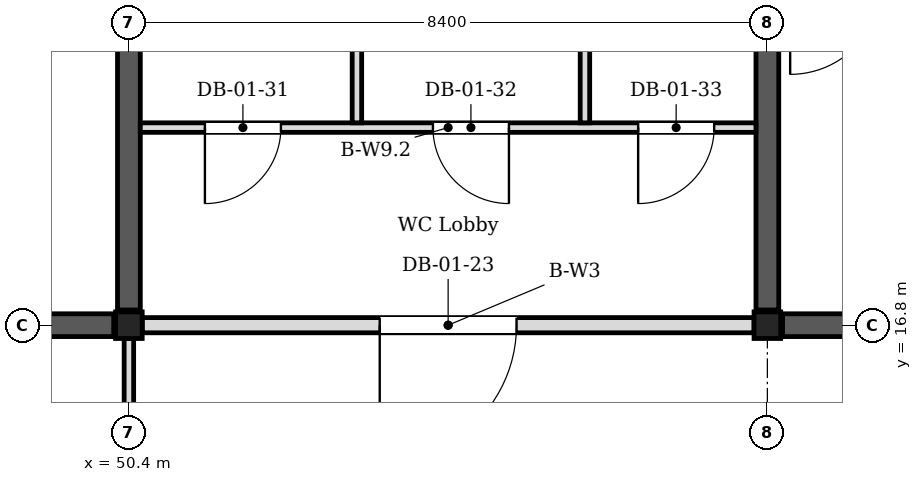
"""IFC4 building model, lengths in metres.
Left out: names, types, materials, properties, quantities, classifications, styles, units other than length and angle.
Written with IfcOpenShell. Run it as: python <this file> out.ifc"""

import sys

from ifc_helpers import new_model, si_unit, direction, frame, frame_2d, origin, origin_2d, place, context, subcontext, project, spatial, rectangle, i_section, extrude, element, fill, save


model = new_model("IFC4")
c1 = context("Model", 3, precision=1e-05, world=origin(), true_north=direction((0.0, 1.0)))
c2 = subcontext(c1, "Body", "Model", "MODEL_VIEW")
j1 = project(units=[si_unit("LENGTHUNIT", "METRE"), si_unit("PLANEANGLEUNIT", "RADIAN")], contexts=[c1])
p1 = place(None, origin())
s1 = spatial("IfcSite", under=j1, at=p1, CompositionType="ELEMENT")
p2 = place(p1, origin())
s2 = spatial("IfcBuilding", under=s1, at=p2, CompositionType="ELEMENT")
p3 = place(p2, frame((0.0, 0.0, 6.0)))
s3 = spatial("IfcBuildingStorey", under=s2, at=p3, CompositionType="ELEMENT", Elevation=6.0)
for number, where, z_axis, x_axis in (
    (1, (50.4, 16.8, 0.0), (0.0, 0.0, 1.0), (1.0, 0.0, 0.0)),
    (2, (58.8, 16.8, 0.0), (0.0, 0.0, 1.0), (1.0, 0.0, 0.0)),
):
    element("IfcColumn", number, at=place(p3, frame(where, z_axis=z_axis, x_axis=x_axis)), inside=s3, PredefinedType="COLUMN", context=c2, shape_type="SweptSolid", body=[
        extrude(i_section(OverallWidth=0.35, OverallDepth=0.35, WebThickness=0.012, FlangeThickness=0.019, FilletRadius=0.013, at=origin_2d()), origin(), (0.0, 0.0, 1.0), 4.2),
    ])
p4 = place(p3, frame((50.4, 17.0, 0.0), z_axis=(0.0, 0.0, 1.0), x_axis=(0.0, 1.0, 0.0)))
e3 = element("IfcWall", 3, at=p4, inside=s3, PredefinedType="SHEAR", context=c2, shape_type="SweptSolid", body=[
    extrude(rectangle(XDim=8.0, YDim=0.3, at=frame_2d((4.0, 0.0))), origin(), (0.0, 0.0, 1.0), 4.05),
])
p5 = place(p3, frame((42.2, 16.8, 0.0), z_axis=(0.0, 0.0, 1.0), x_axis=(1.0, 0.0, 0.0)))
e4 = element("IfcWall", 4, at=p5, inside=s3, PredefinedType="SHEAR", context=c2, shape_type="SweptSolid", body=[
    extrude(rectangle(XDim=8.0, YDim=0.3, at=frame_2d((4.0, 0.0))), origin(), (0.0, 0.0, 1.0), 4.05),
])
p6 = place(p5, frame((3.1, 0.0, 0.0)))
e5 = element("IfcOpeningElement", 5, at=p6, cuts=e4, PredefinedType="OPENING", context=c2, shape_type="SweptSolid", body=[
    extrude(rectangle(XDim=1.8, YDim=2.1, at=frame_2d((0.9, 1.05))), frame((0.0, 0.16, 0.0), z_axis=(0.0, -1.0, 0.0), x_axis=(1.0, 0.0, 0.0)), (0.0, 0.0, 1.0), 0.32),
])
p7 = place(p3, frame((58.8, 17.0, 0.0), z_axis=(0.0, 0.0, 1.0), x_axis=(0.0, 1.0, 0.0)))
e6 = element("IfcWall", 6, at=p7, inside=s3, PredefinedType="SHEAR", context=c2, shape_type="SweptSolid", body=[
    extrude(rectangle(XDim=8.0, YDim=0.3, at=frame_2d((4.0, 0.0))), origin(), (0.0, 0.0, 1.0), 4.05),
])
p8 = place(p3, frame((59.0, 16.8, 0.0), z_axis=(0.0, 0.0, 1.0), x_axis=(1.0, 0.0, 0.0)))
e7 = element("IfcWall", 7, at=p8, inside=s3, PredefinedType="SHEAR", context=c2, shape_type="SweptSolid", body=[
    extrude(rectangle(XDim=8.0, YDim=0.3, at=frame_2d((4.0, 0.0))), origin(), (0.0, 0.0, 1.0), 4.05),
])
p9 = place(p8, frame((3.1, 0.0, 0.0)))
e8 = element("IfcOpeningElement", 8, at=p9, cuts=e7, PredefinedType="OPENING", context=c2, shape_type="SweptSolid", body=[
    extrude(rectangle(XDim=1.8, YDim=2.1, at=frame_2d((0.9, 1.05))), frame((0.0, 0.16, 0.0), z_axis=(0.0, -1.0, 0.0), x_axis=(1.0, 0.0, 0.0)), (0.0, 0.0, 1.0), 0.32),
])
p10 = place(p3, frame((50.575, 16.8, 0.0), z_axis=(0.0, 0.0, 1.0), x_axis=(1.0, 0.0, 0.0)))
e9 = element("IfcWall", 9, at=p10, inside=s3, PredefinedType="PARTITIONING", context=c2, shape_type="SweptSolid", body=[
    extrude(rectangle(XDim=8.05, YDim=0.2, at=frame_2d((4.025, 0.0))), origin(), (0.0, 0.0, 1.0), 3.35),
])
p11 = place(p10, frame((3.125, 0.0, 0.0)))
e10 = element("IfcOpeningElement", 10, at=p11, cuts=e9, PredefinedType="OPENING", context=c2, shape_type="SweptSolid", body=[
    extrude(rectangle(XDim=1.8, YDim=2.1, at=frame_2d((0.9, 1.05))), frame((0.0, 0.11, 0.0), z_axis=(0.0, -1.0, 0.0), x_axis=(1.0, 0.0, 0.0)), (0.0, 0.0, 1.0), 0.22),
])
p12 = place(p3, frame((50.55, 19.4, 0.0), z_axis=(0.0, 0.0, 1.0), x_axis=(1.0, 0.0, 0.0)))
e11 = element("IfcWall", 11, at=p12, inside=s3, PredefinedType="PARTITIONING", context=c2, shape_type="SweptSolid", body=[
    extrude(rectangle(XDim=8.1, YDim=0.125, at=frame_2d((4.05, 0.0))), origin(), (0.0, 0.0, 1.0), 3.35),
])
p13 = place(p12, frame((0.85, 0.0, 0.0)))
e12 = element("IfcOpeningElement", 12, at=p13, cuts=e11, PredefinedType="OPENING", context=c2, shape_type="SweptSolid", body=[
    extrude(rectangle(XDim=1.0, YDim=2.1, at=frame_2d((0.5, 1.05))), frame((0.0, 0.073, 0.0), z_axis=(0.0, -1.0, 0.0), x_axis=(1.0, 0.0, 0.0)), (0.0, 0.0, 1.0), 0.145),
])
p14 = place(p12, frame((3.85, 0.0, 0.0)))
e13 = element("IfcOpeningElement", 13, at=p14, cuts=e11, PredefinedType="OPENING", context=c2, shape_type="SweptSolid", body=[
    extrude(rectangle(XDim=1.0, YDim=2.1, at=frame_2d((0.5, 1.05))), frame((0.0, 0.073, 0.0), z_axis=(0.0, -1.0, 0.0), x_axis=(1.0, 0.0, 0.0)), (0.0, 0.0, 1.0), 0.145),
])
p15 = place(p12, frame((6.55, 0.0, 0.0)))
e14 = element("IfcOpeningElement", 14, at=p15, cuts=e11, PredefinedType="OPENING", context=c2, shape_type="SweptSolid", body=[
    extrude(rectangle(XDim=1.0, YDim=2.1, at=frame_2d((0.5, 1.05))), frame((0.0, 0.073, 0.0), z_axis=(0.0, -1.0, 0.0), x_axis=(1.0, 0.0, 0.0)), (0.0, 0.0, 1.0), 0.145),
])
p16 = place(p3, frame((50.4, 8.575, 0.0), z_axis=(0.0, 0.0, 1.0), x_axis=(0.0, 1.0, 0.0)))
e15 = element("IfcWall", 15, at=p16, inside=s3, PredefinedType="PARTITIONING", context=c2, shape_type="SweptSolid", body=[
    extrude(rectangle(XDim=8.05, YDim=0.125, at=frame_2d((4.025, 0.0))), origin(), (0.0, 0.0, 1.0), 3.35),
])
p17 = place(p16, frame((2.825, 0.0, 0.0)))
e16 = element("IfcOpeningElement", 16, at=p17, cuts=e15, PredefinedType="OPENING", context=c2, shape_type="SweptSolid", body=[
    extrude(rectangle(XDim=2.4, YDim=2.2, at=frame_2d((1.2, 1.1))), frame((0.0, 0.073, 0.0), z_axis=(0.0, -1.0, 0.0), x_axis=(1.0, 0.0, 0.0)), (0.0, 0.0, 1.0), 0.145),
])
for number, where, z_axis, x_axis in (
    (17, (53.4, 19.462, 0.0), (0.0, 0.0, 1.0), (0.0, 1.0, 0.0)),
    (18, (56.4, 19.462, 0.0), (0.0, 0.0, 1.0), (0.0, 1.0, 0.0)),
):
    element("IfcWall", number, at=place(p3, frame(where, z_axis=z_axis, x_axis=x_axis)), inside=s3, PredefinedType="PARTITIONING", context=c2, shape_type="SweptSolid", body=[
        extrude(rectangle(XDim=5.938, YDim=0.125, at=frame_2d((2.969, 0.0))), origin(), (0.0, 0.0, 1.0), 3.35),
    ])
p18 = place(p11, origin())
e19 = element("IfcDoor", 19, at=p18, inside=s3, OperationType="DOUBLE_DOOR_SINGLE_SWING", PredefinedType="DOOR", context=c2, shape_type="SweptSolid", body=[
    extrude(rectangle(XDim=1.8, YDim=2.1, at=frame_2d((0.9, 1.05))), frame((0.0, 0.025, 0.0), z_axis=(0.0, -1.0, 0.0), x_axis=(1.0, 0.0, 0.0)), (0.0, 0.0, 1.0), 0.05),
])
fill(e10, e19)
p19 = place(p13, origin())
e20 = element("IfcDoor", 20, at=p19, inside=s3, OperationType="SINGLE_SWING_LEFT", PredefinedType="DOOR", context=c2, shape_type="SweptSolid", body=[
    extrude(rectangle(XDim=1.0, YDim=2.1, at=frame_2d((0.5, 1.05))), frame((0.0, 0.025, 0.0), z_axis=(0.0, -1.0, 0.0), x_axis=(1.0, 0.0, 0.0)), (0.0, 0.0, 1.0), 0.05),
])
fill(e12, e20)
p20 = place(p14, origin())
e21 = element("IfcDoor", 21, at=p20, inside=s3, OperationType="SINGLE_SWING_LEFT", PredefinedType="DOOR", context=c2, shape_type="SweptSolid", body=[
    extrude(rectangle(XDim=1.0, YDim=2.1, at=frame_2d((0.5, 1.05))), frame((0.0, 0.025, 0.0), z_axis=(0.0, -1.0, 0.0), x_axis=(1.0, 0.0, 0.0)), (0.0, 0.0, 1.0), 0.05),
])
fill(e13, e21)
p21 = place(p15, origin())
e22 = element("IfcDoor", 22, at=p21, inside=s3, OperationType="SINGLE_SWING_LEFT", PredefinedType="DOOR", context=c2, shape_type="SweptSolid", body=[
    extrude(rectangle(XDim=1.0, YDim=2.1, at=frame_2d((0.5, 1.05))), frame((0.0, 0.025, 0.0), z_axis=(0.0, -1.0, 0.0), x_axis=(1.0, 0.0, 0.0)), (0.0, 0.0, 1.0), 0.05),
])
fill(e14, e22)
save(model, sys.argv[1])
